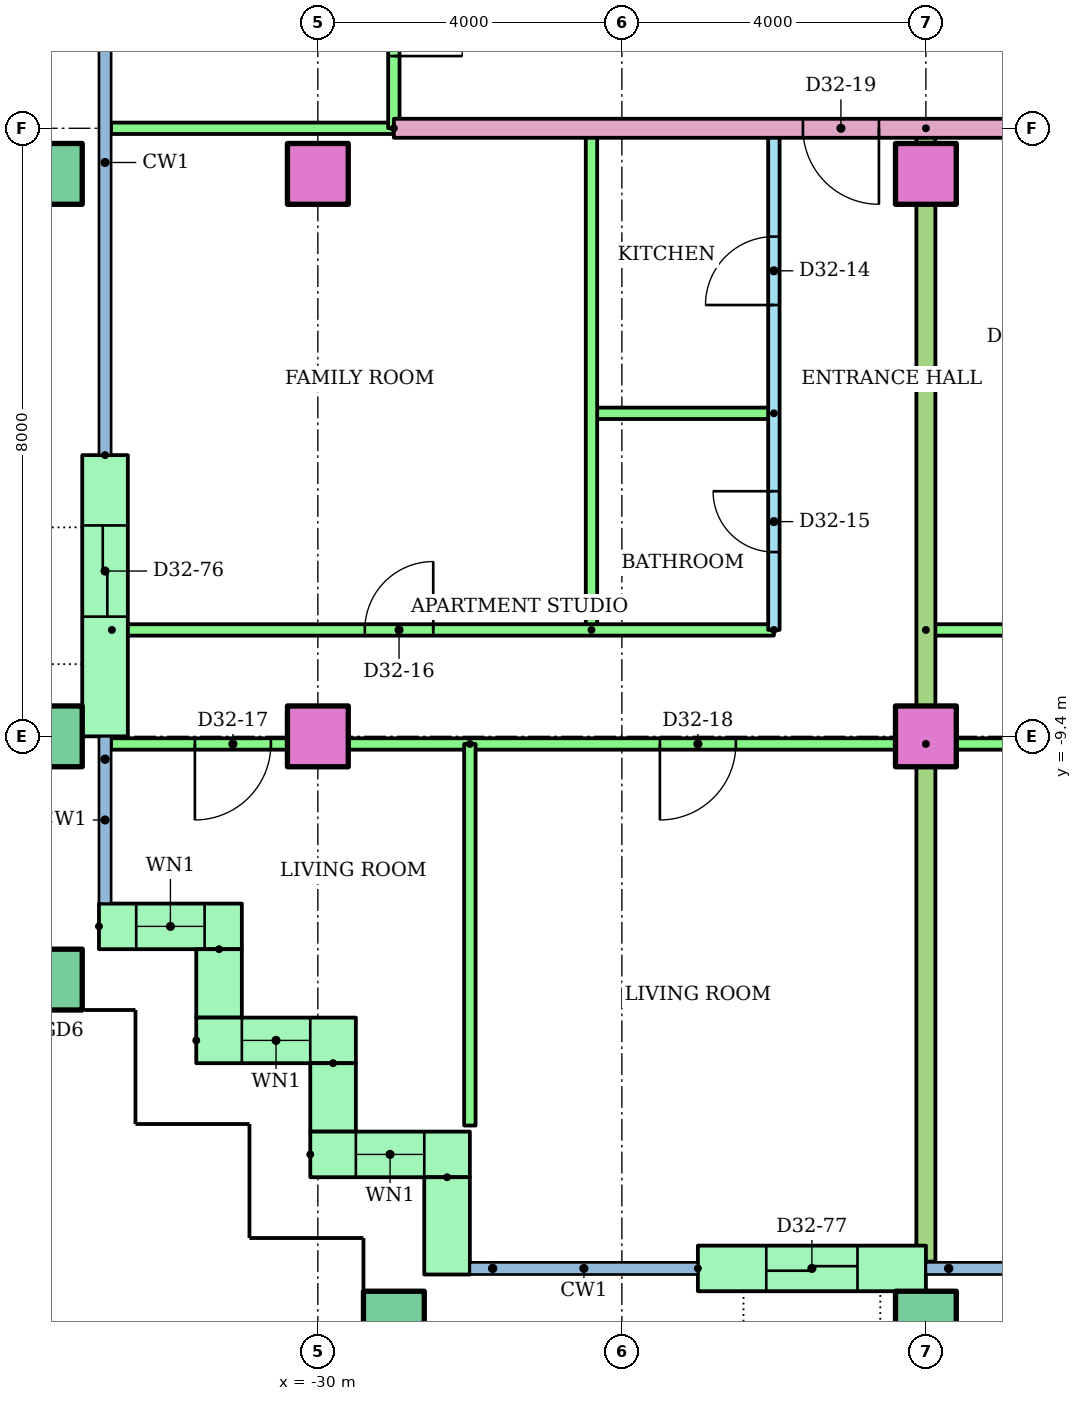
"""IFC4 building model, lengths in metres.
Left out: names, types, materials, properties, quantities, classifications, styles, units other than length and angle.
Written with IfcOpenShell. Run it as: python <this file> out.ifc"""

import sys

from ifc_helpers import new_model, si_unit, direction, frame, frame_2d, origin, origin_2d, place, context, subcontext, project, spatial, rectangle, hollow_rectangle, extrude, element, fill, save


model = new_model("IFC4")
c1 = context("Model", 3, precision=1e-05, world=origin(), true_north=direction((0.0, 1.0)))
c2 = subcontext(c1, "Body", "Model", "MODEL_VIEW")
j1 = project(units=[si_unit("LENGTHUNIT", "METRE"), si_unit("PLANEANGLEUNIT", "RADIAN")], contexts=[c1])
p1 = place(None, origin())
s1 = spatial("IfcSite", under=j1, at=p1, CompositionType="ELEMENT")
p2 = place(p1, origin())
s2 = spatial("IfcBuilding", under=s1, at=p2, CompositionType="ELEMENT")
p3 = place(p2, frame((0.0, 0.0, 126.2)))
s3 = spatial("IfcBuildingStorey", under=s2, at=p3, CompositionType="ELEMENT", Elevation=126.2)
for number, where in (
    (1, (-29.0, -17.1, 0.0)),
    (2, (-22.0, -17.1, 0.0)),
    (3, (-33.5, -12.6, 0.0)),
    (4, (-33.5, -9.4, 0.0)),
):
    element("IfcColumn", number, at=place(p3, frame(where)), inside=s3, PredefinedType="COLUMN", context=c2, shape_type="SweptSolid", body=[
        extrude(hollow_rectangle(XDim=0.8, YDim=0.8, WallThickness=0.04, at=origin_2d()), origin(), (0.0, 0.0, 1.0), 3.2),
    ])
for number, where in (
    (5, (-30.0, -9.4, 0.0)),
    (6, (-22.0, -9.4, 0.0)),
):
    element("IfcColumn", number, at=place(p3, frame(where)), inside=s3, PredefinedType="COLUMN", context=c2, shape_type="SweptSolid", body=[
        extrude(rectangle(XDim=0.8, YDim=0.8, at=origin_2d()), origin(), (0.0, 0.0, 1.0), 3.2),
    ])
p4 = place(p3, frame((-33.5, -2.0, 0.0)))
e7 = element("IfcColumn", 7, at=p4, inside=s3, PredefinedType="COLUMN", context=c2, shape_type="SweptSolid", body=[
    extrude(hollow_rectangle(XDim=0.8, YDim=0.8, WallThickness=0.04, at=origin_2d()), origin(), (0.0, 0.0, 1.0), 3.2),
])
for number, where in (
    (8, (-30.0, -2.0, 0.0)),
    (9, (-22.0, -2.0, 0.0)),
):
    element("IfcColumn", number, at=place(p3, frame(where)), inside=s3, PredefinedType="COLUMN", context=c2, shape_type="SweptSolid", body=[
        extrude(rectangle(XDim=0.8, YDim=0.8, at=origin_2d()), origin(), (0.0, 0.0, 1.0), 3.2),
    ])
p5 = place(p3, frame((-32.8, -5.7, 0.0), z_axis=(0.0, 0.0, 1.0), x_axis=(0.0, -1.0, 0.0)))
e10 = element("IfcWall", 10, at=p5, inside=s3, PredefinedType="STANDARD", context=c2, shape_type="SweptSolid", body=[
    extrude(rectangle(XDim=3.7, YDim=0.6, at=frame_2d((1.85, 0.0))), origin(), (0.0, 0.0, 1.0), 2.92),
])
p6 = place(p5, frame((0.925, 0.0, 0.0)))
e11 = element("IfcOpeningElement", 11, at=p6, cuts=e10, PredefinedType="OPENING", context=c2, shape_type="SweptSolid", body=[
    extrude(rectangle(XDim=1.2, YDim=2.1, at=frame_2d((0.6, 1.05))), frame((0.0, 0.31, 0.0), z_axis=(0.0, -1.0, 0.0), x_axis=(1.0, 0.0, 0.0)), (0.0, 0.0, 1.0), 0.62),
])
p7 = place(p3, frame((-32.88, -11.9, 0.0)))
e12 = element("IfcWall", 12, at=p7, inside=s3, PredefinedType="STANDARD", context=c2, shape_type="SweptSolid", body=[
    extrude(rectangle(XDim=1.88, YDim=0.6, at=frame_2d((0.94, 0.0))), origin(), (0.0, 0.0, 1.0), 2.92),
])
p8 = place(p7, frame((0.49, 0.0, 0.9)))
e13 = element("IfcOpeningElement", 13, at=p8, cuts=e12, PredefinedType="OPENING", context=c2, shape_type="SweptSolid", body=[
    extrude(rectangle(XDim=0.9, YDim=1.5, at=frame_2d((0.45, 0.75))), frame((0.0, 0.31, 0.0), z_axis=(0.0, -1.0, 0.0), x_axis=(1.0, 0.0, 0.0)), (0.0, 0.0, 1.0), 0.62),
])
p9 = place(p3, frame((-31.3, -12.2, 0.0), z_axis=(0.0, 0.0, 1.0), x_axis=(0.0, -1.0, 0.0)))
e14 = element("IfcWall", 14, at=p9, inside=s3, PredefinedType="STANDARD", context=c2, shape_type="SweptSolid", body=[
    extrude(rectangle(XDim=0.9, YDim=0.6, at=frame_2d((0.45, 0.0))), origin(), (0.0, 0.0, 1.0), 2.92),
])
p10 = place(p3, frame((-31.6, -13.4, 0.0)))
e15 = element("IfcWall", 15, at=p10, inside=s3, PredefinedType="STANDARD", context=c2, shape_type="SweptSolid", body=[
    extrude(rectangle(XDim=2.1, YDim=0.6, at=frame_2d((1.05, 0.0))), origin(), (0.0, 0.0, 1.0), 2.92),
])
p11 = place(p10, frame((0.6, 0.0, 0.9)))
e16 = element("IfcOpeningElement", 16, at=p11, cuts=e15, PredefinedType="OPENING", context=c2, shape_type="SweptSolid", body=[
    extrude(rectangle(XDim=0.9, YDim=1.5, at=frame_2d((0.45, 0.75))), frame((0.0, 0.31, 0.0), z_axis=(0.0, -1.0, 0.0), x_axis=(1.0, 0.0, 0.0)), (0.0, 0.0, 1.0), 0.62),
])
p12 = place(p3, frame((-29.8, -13.7, 0.0), z_axis=(0.0, 0.0, 1.0), x_axis=(0.0, -1.0, 0.0)))
e17 = element("IfcWall", 17, at=p12, inside=s3, PredefinedType="STANDARD", context=c2, shape_type="SweptSolid", body=[
    extrude(rectangle(XDim=0.9, YDim=0.6, at=frame_2d((0.45, 0.0))), origin(), (0.0, 0.0, 1.0), 2.92),
])
p13 = place(p3, frame((-30.1, -14.9, 0.0)))
e18 = element("IfcWall", 18, at=p13, inside=s3, PredefinedType="STANDARD", context=c2, shape_type="SweptSolid", body=[
    extrude(rectangle(XDim=2.1, YDim=0.6, at=frame_2d((1.05, 0.0))), origin(), (0.0, 0.0, 1.0), 2.92),
])
p14 = place(p13, frame((0.6, 0.0, 0.9)))
e19 = element("IfcOpeningElement", 19, at=p14, cuts=e18, PredefinedType="OPENING", context=c2, shape_type="SweptSolid", body=[
    extrude(rectangle(XDim=0.9, YDim=1.5, at=frame_2d((0.45, 0.75))), frame((0.0, 0.31, 0.0), z_axis=(0.0, -1.0, 0.0), x_axis=(1.0, 0.0, 0.0)), (0.0, 0.0, 1.0), 0.62),
])
p15 = place(p3, frame((-28.3, -15.2, 0.0), z_axis=(0.0, 0.0, 1.0), x_axis=(0.0, -1.0, 0.0)))
e20 = element("IfcWall", 20, at=p15, inside=s3, PredefinedType="STANDARD", context=c2, shape_type="SweptSolid", body=[
    extrude(rectangle(XDim=1.28, YDim=0.6, at=frame_2d((0.64, 0.0))), origin(), (0.0, 0.0, 1.0), 2.92),
])
p16 = place(p3, frame((-25.0, -16.4, 0.0)))
e21 = element("IfcWall", 21, at=p16, inside=s3, PredefinedType="STANDARD", context=c2, shape_type="SweptSolid", body=[
    extrude(rectangle(XDim=3.0, YDim=0.6, at=frame_2d((1.5, 0.0))), origin(), (0.0, 0.0, 1.0), 2.92),
])
p17 = place(p16, frame((0.9, 0.0, 0.0)))
e22 = element("IfcOpeningElement", 22, at=p17, cuts=e21, PredefinedType="OPENING", context=c2, shape_type="SweptSolid", body=[
    extrude(rectangle(XDim=1.2, YDim=2.1, at=frame_2d((0.6, 1.05))), frame((0.0, 0.31, 0.0), z_axis=(0.0, -1.0, 0.0), x_axis=(1.0, 0.0, 0.0)), (0.0, 0.0, 1.0), 0.62),
])
p18 = place(p3, frame((-24.0, -8.0, 0.0), z_axis=(0.0, 0.0, 1.0), x_axis=(0.0, 1.0, 0.0)))
e23 = element("IfcWall", 23, at=p18, inside=s3, PredefinedType="PARTITIONING", context=c2, shape_type="SweptSolid", body=[
    extrude(rectangle(XDim=6.6, YDim=0.15, at=frame_2d((3.3, 0.0))), origin(), (0.0, 0.0, 1.0), 2.4),
])
p19 = place(p18, frame((4.275, 0.0, 0.0)))
e24 = element("IfcOpeningElement", 24, at=p19, cuts=e23, PredefinedType="OPENING", context=c2, shape_type="SweptSolid", body=[
    extrude(rectangle(XDim=0.9, YDim=2.1, at=frame_2d((0.45, 1.05))), frame((0.0, 0.085, 0.0), z_axis=(0.0, -1.0, 0.0), x_axis=(1.0, 0.0, 0.0)), (0.0, 0.0, 1.0), 0.17),
])
p20 = place(p18, frame((1.025, 0.0, 0.0)))
e25 = element("IfcOpeningElement", 25, at=p20, cuts=e23, PredefinedType="OPENING", context=c2, shape_type="SweptSolid", body=[
    extrude(rectangle(XDim=0.8, YDim=2.1, at=frame_2d((0.4, 1.05))), frame((0.0, 0.085, 0.0), z_axis=(0.0, -1.0, 0.0), x_axis=(1.0, 0.0, 0.0)), (0.0, 0.0, 1.0), 0.17),
])
p21 = place(p3, frame((-24.0, -5.15, 0.0), z_axis=(0.0, 0.0, 1.0), x_axis=(-1.0, 0.0, 0.0)))
e26 = element("IfcWall", 26, at=p21, inside=s3, PredefinedType="PARTITIONING", context=c2, shape_type="SweptSolid", body=[
    extrude(rectangle(XDim=2.4, YDim=0.15, at=frame_2d((1.2, 0.0))), origin(), (0.0, 0.0, 1.0), 2.4),
])
p22 = place(p3, frame((-26.4, -8.0, 0.0), z_axis=(0.0, 0.0, 1.0), x_axis=(0.0, 1.0, 0.0)))
e27 = element("IfcWall", 27, at=p22, inside=s3, PredefinedType="PARTITIONING", context=c2, shape_type="SweptSolid", body=[
    extrude(rectangle(XDim=6.6, YDim=0.15, at=frame_2d((3.3, 0.0))), origin(), (0.0, 0.0, 1.0), 2.4),
])
p23 = place(p3, frame((-32.71, -8.0, 0.0)))
e28 = element("IfcWall", 28, at=p23, inside=s3, PredefinedType="PARTITIONING", context=c2, shape_type="SweptSolid", body=[
    extrude(rectangle(XDim=8.71, YDim=0.15, at=frame_2d((4.355, 0.0))), origin(), (0.0, 0.0, 1.0), 2.4),
])
p24 = place(p23, frame((3.328, 0.0, 0.0)))
e29 = element("IfcOpeningElement", 29, at=p24, cuts=e28, PredefinedType="OPENING", context=c2, shape_type="SweptSolid", body=[
    extrude(rectangle(XDim=0.9, YDim=2.1, at=frame_2d((0.45, 1.05))), frame((0.0, 0.085, 0.0), z_axis=(0.0, -1.0, 0.0), x_axis=(1.0, 0.0, 0.0)), (0.0, 0.0, 1.0), 0.17),
])
p25 = place(p3, frame((-22.0, -9.5, 0.0), z_axis=(0.0, 0.0, 1.0), x_axis=(-1.0, 0.0, 0.0)))
e30 = element("IfcWall", 30, at=p25, inside=s3, PredefinedType="PARTITIONING", context=c2, shape_type="SweptSolid", body=[
    extrude(rectangle(XDim=10.72, YDim=0.15, at=frame_2d((5.36, 0.0))), origin(), (0.0, 0.0, 1.0), 2.4),
])
p26 = place(p25, frame((8.618, 0.0, 0.0)))
e31 = element("IfcOpeningElement", 31, at=p26, cuts=e30, PredefinedType="OPENING", context=c2, shape_type="SweptSolid", body=[
    extrude(rectangle(XDim=1.0, YDim=2.1, at=frame_2d((0.5, 1.05))), frame((0.0, 0.085, 0.0), z_axis=(0.0, -1.0, 0.0), x_axis=(1.0, 0.0, 0.0)), (0.0, 0.0, 1.0), 0.17),
])
p27 = place(p25, frame((2.5, 0.0, 0.0)))
e32 = element("IfcOpeningElement", 32, at=p27, cuts=e30, PredefinedType="OPENING", context=c2, shape_type="SweptSolid", body=[
    extrude(rectangle(XDim=1.0, YDim=2.1, at=frame_2d((0.5, 1.05))), frame((0.0, 0.085, 0.0), z_axis=(0.0, -1.0, 0.0), x_axis=(1.0, 0.0, 0.0)), (0.0, 0.0, 1.0), 0.17),
])
p28 = place(p3, frame((-28.0, -9.5, 0.0), z_axis=(0.0, 0.0, 1.0), x_axis=(0.0, -1.0, 0.0)))
e33 = element("IfcWall", 33, at=p28, inside=s3, PredefinedType="PARTITIONING", context=c2, shape_type="SweptSolid", body=[
    extrude(rectangle(XDim=5.02, YDim=0.15, at=frame_2d((2.51, 0.0))), origin(), (0.0, 0.0, 1.0), 2.4),
])
p29 = place(p3, frame((-22.0, -8.0, 0.0)))
e34 = element("IfcWall", 34, at=p29, inside=s3, PredefinedType="PARTITIONING", context=c2, shape_type="SweptSolid", body=[
    extrude(rectangle(XDim=6.0, YDim=0.15, at=frame_2d((3.0, 0.0))), origin(), (0.0, 0.0, 1.0), 2.4),
])
p30 = place(p29, frame((1.35, 0.0, 0.0)))
e35 = element("IfcOpeningElement", 35, at=p30, cuts=e34, PredefinedType="OPENING", context=c2, shape_type="SweptSolid", body=[
    extrude(rectangle(XDim=0.9, YDim=2.1, at=frame_2d((0.45, 1.05))), frame((0.0, 0.085, 0.0), z_axis=(0.0, -1.0, 0.0), x_axis=(1.0, 0.0, 0.0)), (0.0, 0.0, 1.0), 0.17),
])
p31 = place(p3, frame((-14.0, -9.5, 0.0), z_axis=(0.0, 0.0, 1.0), x_axis=(-1.0, 0.0, 0.0)))
e36 = element("IfcWall", 36, at=p31, inside=s3, PredefinedType="PARTITIONING", context=c2, shape_type="SweptSolid", body=[
    extrude(rectangle(XDim=8.0, YDim=0.15, at=frame_2d((4.0, 0.0))), origin(), (0.0, 0.0, 1.0), 2.4),
])
p32 = place(p31, frame((5.5, 0.0, 0.0)))
e37 = element("IfcOpeningElement", 37, at=p32, cuts=e36, PredefinedType="OPENING", context=c2, shape_type="SweptSolid", body=[
    extrude(rectangle(XDim=1.0, YDim=2.1, at=frame_2d((0.5, 1.05))), frame((0.0, 0.085, 0.0), z_axis=(0.0, -1.0, 0.0), x_axis=(1.0, 0.0, 0.0)), (0.0, 0.0, 1.0), 0.17),
])
p33 = place(p31, frame((1.5, 0.0, 0.0)))
e38 = element("IfcOpeningElement", 38, at=p33, cuts=e36, PredefinedType="OPENING", context=c2, shape_type="SweptSolid", body=[
    extrude(rectangle(XDim=1.0, YDim=2.1, at=frame_2d((0.5, 1.05))), frame((0.0, 0.085, 0.0), z_axis=(0.0, -1.0, 0.0), x_axis=(1.0, 0.0, 0.0)), (0.0, 0.0, 1.0), 0.17),
])
p34 = place(p3, frame((-22.0, -1.4, 0.0), z_axis=(0.0, 0.0, 1.0), x_axis=(0.0, -1.0, 0.0)))
e39 = element("IfcWall", 39, at=p34, inside=s3, PredefinedType="PARTITIONING", context=c2, shape_type="SweptSolid", body=[
    extrude(rectangle(XDim=14.91, YDim=0.25, at=frame_2d((7.455, 0.0))), origin(), (0.0, 0.0, 1.0), 2.4),
])
p35 = place(p3, frame((-14.0, -1.4, 0.0), z_axis=(0.0, 0.0, 1.0), x_axis=(-1.0, 0.0, 0.0)))
e40 = element("IfcWall", 40, at=p35, inside=s3, PredefinedType="PARTITIONING", context=c2, shape_type="SweptSolid", body=[
    extrude(rectangle(XDim=15.0, YDim=0.25, at=frame_2d((7.5, 0.0))), origin(), (0.0, 0.0, 1.0), 2.4),
])
p36 = place(p35, frame((8.618, 0.0, 0.0)))
e41 = element("IfcOpeningElement", 41, at=p36, cuts=e40, PredefinedType="OPENING", context=c2, shape_type="SweptSolid", body=[
    extrude(rectangle(XDim=1.0, YDim=2.1, at=frame_2d((0.5, 1.05))), frame((0.0, 0.135, 0.0), z_axis=(0.0, -1.0, 0.0), x_axis=(1.0, 0.0, 0.0)), (0.0, 0.0, 1.0), 0.27),
])
p37 = place(p35, frame((0.618, 0.0, 0.0)))
e42 = element("IfcOpeningElement", 42, at=p37, cuts=e40, PredefinedType="OPENING", context=c2, shape_type="SweptSolid", body=[
    extrude(rectangle(XDim=1.0, YDim=2.1, at=frame_2d((0.5, 1.05))), frame((0.0, 0.135, 0.0), z_axis=(0.0, -1.0, 0.0), x_axis=(1.0, 0.0, 0.0)), (0.0, 0.0, 1.0), 0.27),
])
p38 = place(p3, frame((-29.0, -1.4, 0.0), z_axis=(0.0, 0.0, 1.0), x_axis=(-1.0, 0.0, 0.0)))
e43 = element("IfcWall", 43, at=p38, inside=s3, PredefinedType="PARTITIONING", context=c2, shape_type="SweptSolid", body=[
    extrude(rectangle(XDim=3.72, YDim=0.15, at=frame_2d((1.86, 0.0))), origin(), (0.0, 0.0, 1.0), 2.4),
])
p39 = place(p3, frame((-29.0, 1.4, 0.0), z_axis=(0.0, 0.0, 1.0), x_axis=(0.0, -1.0, 0.0)))
e44 = element("IfcWall", 44, at=p39, inside=s3, PredefinedType="PARTITIONING", context=c2, shape_type="SweptSolid", body=[
    extrude(rectangle(XDim=2.8, YDim=0.15, at=frame_2d((1.4, 0.0))), origin(), (0.0, 0.0, 1.0), 2.4),
])
p40 = place(p39, frame((0.95, 0.0, 0.0)))
e45 = element("IfcOpeningElement", 45, at=p40, cuts=e44, PredefinedType="OPENING", context=c2, shape_type="SweptSolid", body=[
    extrude(rectangle(XDim=0.9, YDim=2.1, at=frame_2d((0.45, 1.05))), frame((0.0, 0.085, 0.0), z_axis=(0.0, -1.0, 0.0), x_axis=(1.0, 0.0, 0.0)), (0.0, 0.0, 1.0), 0.17),
])
p41 = place(p8, origin())
e46 = element("IfcWindow", 46, at=p41, inside=s3, PartitioningType="SINGLE_PANEL", PredefinedType="WINDOW", context=c2, shape_type="SweptSolid", body=[
    extrude(rectangle(XDim=0.9, YDim=1.5, at=frame_2d((0.45, 0.75))), frame((0.0, 0.03, 0.0), z_axis=(0.0, -1.0, 0.0), x_axis=(1.0, 0.0, 0.0)), (0.0, 0.0, 1.0), 0.06),
])
fill(e13, e46)
p42 = place(p11, origin())
e47 = element("IfcWindow", 47, at=p42, inside=s3, PartitioningType="SINGLE_PANEL", PredefinedType="WINDOW", context=c2, shape_type="SweptSolid", body=[
    extrude(rectangle(XDim=0.9, YDim=1.5, at=frame_2d((0.45, 0.75))), frame((0.0, 0.03, 0.0), z_axis=(0.0, -1.0, 0.0), x_axis=(1.0, 0.0, 0.0)), (0.0, 0.0, 1.0), 0.06),
])
fill(e16, e47)
p43 = place(p14, origin())
e48 = element("IfcWindow", 48, at=p43, inside=s3, PartitioningType="SINGLE_PANEL", PredefinedType="WINDOW", context=c2, shape_type="SweptSolid", body=[
    extrude(rectangle(XDim=0.9, YDim=1.5, at=frame_2d((0.45, 0.75))), frame((0.0, 0.03, 0.0), z_axis=(0.0, -1.0, 0.0), x_axis=(1.0, 0.0, 0.0)), (0.0, 0.0, 1.0), 0.06),
])
fill(e19, e48)
p44 = place(p19, origin())
e49 = element("IfcDoor", 49, at=p44, inside=s3, OperationType="SINGLE_SWING_LEFT", PredefinedType="DOOR", context=c2, shape_type="SweptSolid", body=[
    extrude(rectangle(XDim=0.9, YDim=2.1, at=frame_2d((0.45, 1.05))), frame((0.0, 0.025, 0.0), z_axis=(0.0, -1.0, 0.0), x_axis=(1.0, 0.0, 0.0)), (0.0, 0.0, 1.0), 0.05),
])
fill(e24, e49)
p45 = place(p20, origin())
e50 = element("IfcDoor", 50, at=p45, inside=s3, OperationType="SINGLE_SWING_RIGHT", PredefinedType="DOOR", context=c2, shape_type="SweptSolid", body=[
    extrude(rectangle(XDim=0.8, YDim=2.1, at=frame_2d((0.4, 1.05))), frame((0.0, 0.025, 0.0), z_axis=(0.0, -1.0, 0.0), x_axis=(1.0, 0.0, 0.0)), (0.0, 0.0, 1.0), 0.05),
])
fill(e25, e50)
p46 = place(p24, origin())
e51 = element("IfcDoor", 51, at=p46, inside=s3, OperationType="SINGLE_SWING_RIGHT", PredefinedType="DOOR", context=c2, shape_type="SweptSolid", body=[
    extrude(rectangle(XDim=0.9, YDim=2.1, at=frame_2d((0.45, 1.05))), frame((0.0, 0.025, 0.0), z_axis=(0.0, -1.0, 0.0), x_axis=(1.0, 0.0, 0.0)), (0.0, 0.0, 1.0), 0.05),
])
fill(e29, e51)
p47 = place(p26, origin())
e52 = element("IfcDoor", 52, at=p47, inside=s3, OperationType="SINGLE_SWING_RIGHT", PredefinedType="DOOR", context=c2, shape_type="SweptSolid", body=[
    extrude(rectangle(XDim=1.0, YDim=2.1, at=frame_2d((0.5, 1.05))), frame((0.0, 0.025, 0.0), z_axis=(0.0, -1.0, 0.0), x_axis=(1.0, 0.0, 0.0)), (0.0, 0.0, 1.0), 0.05),
])
fill(e31, e52)
p48 = place(p27, origin())
e53 = element("IfcDoor", 53, at=p48, inside=s3, OperationType="SINGLE_SWING_RIGHT", PredefinedType="DOOR", context=c2, shape_type="SweptSolid", body=[
    extrude(rectangle(XDim=1.0, YDim=2.1, at=frame_2d((0.5, 1.05))), frame((0.0, 0.025, 0.0), z_axis=(0.0, -1.0, 0.0), x_axis=(1.0, 0.0, 0.0)), (0.0, 0.0, 1.0), 0.05),
])
fill(e32, e53)
p49 = place(p36, origin())
e54 = element("IfcDoor", 54, at=p49, inside=s3, OperationType="SINGLE_SWING_LEFT", PredefinedType="DOOR", context=c2, shape_type="SweptSolid", body=[
    extrude(rectangle(XDim=1.0, YDim=2.1, at=frame_2d((0.5, 1.05))), frame((0.0, 0.025, 0.0), z_axis=(0.0, -1.0, 0.0), x_axis=(1.0, 0.0, 0.0)), (0.0, 0.0, 1.0), 0.05),
])
fill(e41, e54)
p50 = place(p40, origin())
e55 = element("IfcDoor", 55, at=p50, inside=s3, OperationType="SINGLE_SWING_RIGHT", PredefinedType="DOOR", context=c2, shape_type="SweptSolid", body=[
    extrude(rectangle(XDim=0.9, YDim=2.1, at=frame_2d((0.45, 1.05))), frame((0.0, 0.025, 0.0), z_axis=(0.0, -1.0, 0.0), x_axis=(1.0, 0.0, 0.0)), (0.0, 0.0, 1.0), 0.05),
])
fill(e45, e55)
p51 = place(p6, origin())
e56 = element("IfcDoor", 56, at=p51, inside=s3, OperationType="SLIDING_TO_LEFT", PredefinedType="DOOR", context=c2, shape_type="SweptSolid", body=[
    extrude(rectangle(XDim=1.2, YDim=2.1, at=frame_2d((0.6, 1.05))), frame((0.0, 0.025, 0.0), z_axis=(0.0, -1.0, 0.0), x_axis=(1.0, 0.0, 0.0)), (0.0, 0.0, 1.0), 0.05),
])
fill(e11, e56)
p52 = place(p17, origin())
e57 = element("IfcDoor", 57, at=p52, inside=s3, OperationType="SLIDING_TO_LEFT", PredefinedType="DOOR", context=c2, shape_type="SweptSolid", body=[
    extrude(rectangle(XDim=1.2, YDim=2.1, at=frame_2d((0.6, 1.05))), frame((0.0, 0.025, 0.0), z_axis=(0.0, -1.0, 0.0), x_axis=(1.0, 0.0, 0.0)), (0.0, 0.0, 1.0), 0.05),
])
fill(e22, e57)
save(model, sys.argv[1])
